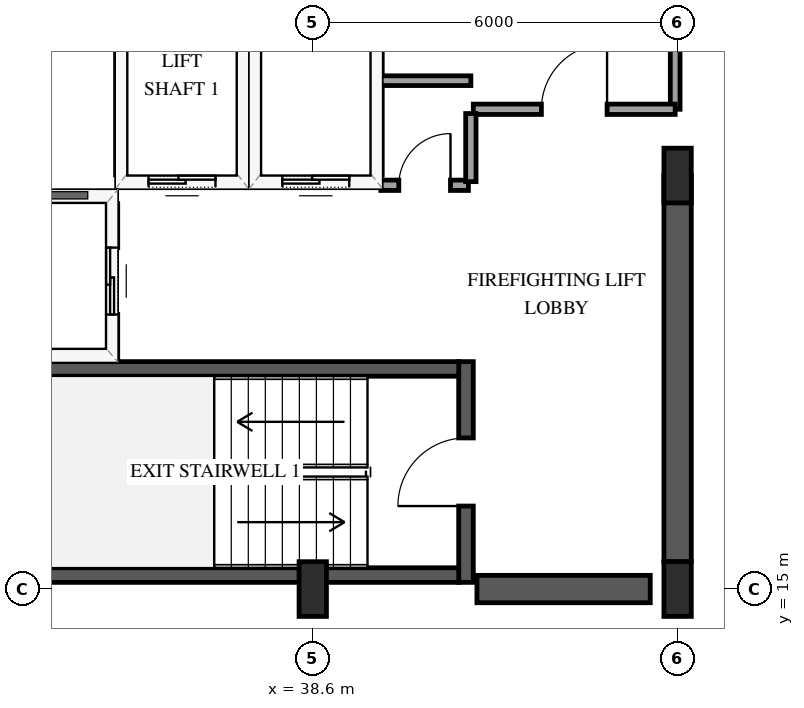
"""IFC4 building model, lengths in metres.
Left out: names, types, materials, properties, quantities, classifications, styles, units other than length and angle.
Written with IfcOpenShell. Run it as: python <this file> out.ifc"""

import sys

from ifc_helpers import new_model, si_unit, direction, frame, frame_2d, origin, origin_2d, place, context, subcontext, project, spatial, rectangle, extrude, element, fill, save


model = new_model("IFC4")
c1 = context("Model", 3, precision=1e-05, world=origin(), true_north=direction((0.0, 1.0)))
c2 = subcontext(c1, "Body", "Model", "MODEL_VIEW")
j1 = project(units=[si_unit("LENGTHUNIT", "METRE"), si_unit("PLANEANGLEUNIT", "RADIAN")], contexts=[c1])
p1 = place(None, origin())
s1 = spatial("IfcSite", under=j1, at=p1, CompositionType="ELEMENT")
p2 = place(p1, origin())
s2 = spatial("IfcBuilding", under=s1, at=p2, CompositionType="ELEMENT")
p3 = place(p2, frame((0.0, 0.0, 208.6)))
s3 = spatial("IfcBuildingStorey", under=s2, at=p3, CompositionType="ELEMENT", Elevation=208.6)
p4 = place(p3, frame((41.12, 15.11, 0.0), z_axis=(0.0, 0.0, 1.0), x_axis=(0.0, 1.0, 0.0)))
e1 = element("IfcWall", 1, at=p4, inside=s3, PredefinedType="SHEAR", context=c2, shape_type="SweptSolid", body=[
    extrude(rectangle(XDim=3.63, YDim=0.24, at=frame_2d((1.815, 0.0))), origin(), (0.0, 0.0, 1.0), 3.6),
])
p5 = place(p4, frame((1.255, 0.0, 0.0)))
e2 = element("IfcOpeningElement", 2, at=p5, cuts=e1, PredefinedType="OPENING", context=c2, shape_type="SweptSolid", body=[
    extrude(rectangle(XDim=1.12, YDim=2.15, at=frame_2d((0.56, 1.075))), frame((0.0, 0.13, 0.0), z_axis=(0.0, -1.0, 0.0), x_axis=(1.0, 0.0, 0.0)), (0.0, 0.0, 1.0), 0.26),
])
for number, where, z_axis, x_axis in (
    (3, (33.0, 15.23, 0.0), (0.0, 0.0, 1.0), (1.0, 0.0, 0.0)),
    (4, (33.0, 18.62, 0.0), (0.0, 0.0, 1.0), (1.0, 0.0, 0.0)),
):
    element("IfcWall", number, at=place(p3, frame(where, z_axis=z_axis, x_axis=x_axis)), inside=s3, PredefinedType="SHEAR", context=c2, shape_type="SweptSolid", body=[
        extrude(rectangle(XDim=8.0, YDim=0.24, at=frame_2d((4.0, 0.0))), origin(), (0.0, 0.0, 1.0), 3.6),
    ])
p6 = place(p3, frame((41.3, 15.0, 0.0), z_axis=(0.0, 0.0, 1.0), x_axis=(1.0, 0.0, 0.0)))
e5 = element("IfcWall", 5, at=p6, inside=s3, PredefinedType="SHEAR", context=c2, shape_type="SweptSolid", body=[
    extrude(rectangle(XDim=2.85, YDim=0.45, at=frame_2d((1.425, 0.0))), origin(), (0.0, 0.0, 1.0), 3.6),
])
p7 = place(p3, frame((44.6, 15.45, 0.0), z_axis=(0.0, 0.0, 1.0), x_axis=(0.0, 1.0, 0.0)))
e6 = element("IfcWall", 6, at=p7, inside=s3, PredefinedType="SHEAR", context=c2, shape_type="SweptSolid", body=[
    extrude(rectangle(XDim=6.35, YDim=0.45, at=frame_2d((3.175, 0.0))), origin(), (0.0, 0.0, 1.0), 3.6),
])
for number, where, z_axis, x_axis in (
    (7, (38.6, 15.0, 0.0), (0.0, 0.0, 1.0), (1.0, 0.0, 0.0)),
    (8, (44.6, 15.0, 0.0), (0.0, 0.0, 1.0), (1.0, 0.0, 0.0)),
    (9, (44.6, 21.8, 0.0), (0.0, 0.0, 1.0), (1.0, 0.0, 0.0)),
):
    element("IfcColumn", number, at=place(p3, frame(where, z_axis=z_axis, x_axis=x_axis)), inside=s3, PredefinedType="PILASTER", context=c2, shape_type="SweptSolid", body=[
        extrude(rectangle(XDim=0.45, YDim=0.9, at=origin_2d()), origin(), (0.0, 0.0, 1.0), 3.6),
    ])
p8 = place(p3, frame((35.45, 21.7, 0.0), z_axis=(0.0, 0.0, 1.0), x_axis=(1.0, 0.0, 0.0)))
e10 = element("IfcWall", 10, at=p8, inside=s3, PredefinedType="SOLIDWALL", context=c2, shape_type="SweptSolid", body=[
    extrude(rectangle(XDim=2.0, YDim=0.185, at=frame_2d((1.0, 0.0))), origin(), (0.0, 0.0, 1.0), 3.3),
])
p9 = place(p8, frame((0.45, 0.0, 0.0)))
e11 = element("IfcOpeningElement", 11, at=p9, cuts=e10, PredefinedType="OPENING", context=c2, shape_type="SweptSolid", body=[
    extrude(rectangle(XDim=1.1, YDim=2.15, at=frame_2d((0.55, 1.075))), frame((0.0, 0.103, 0.0), z_axis=(0.0, -1.0, 0.0), x_axis=(1.0, 0.0, 0.0)), (0.0, 0.0, 1.0), 0.205),
])
for number, where, z_axis, x_axis in (
    (12, (35.45, 21.81, 0.0), (0.0, 0.0, 1.0), (0.0, 1.0, 0.0)),
    (13, (37.45, 21.81, 0.0), (0.0, 0.0, 1.0), (0.0, 1.0, 0.0)),
):
    element("IfcWall", number, at=place(p3, frame(where, z_axis=z_axis, x_axis=x_axis)), inside=s3, PredefinedType="SOLIDWALL", context=c2, shape_type="SweptSolid", body=[
        extrude(rectangle(XDim=2.38, YDim=0.185, at=frame_2d((1.19, 0.0))), origin(), (0.0, 0.0, 1.0), 3.3),
    ])
p10 = place(p3, frame((37.65, 21.7, 0.0), z_axis=(0.0, 0.0, 1.0), x_axis=(1.0, 0.0, 0.0)))
e14 = element("IfcWall", 14, at=p10, inside=s3, PredefinedType="SOLIDWALL", context=c2, shape_type="SweptSolid", body=[
    extrude(rectangle(XDim=2.0, YDim=0.185, at=frame_2d((1.0, 0.0))), origin(), (0.0, 0.0, 1.0), 3.3),
])
p11 = place(p10, frame((0.45, 0.0, 0.0)))
e15 = element("IfcOpeningElement", 15, at=p11, cuts=e14, PredefinedType="OPENING", context=c2, shape_type="SweptSolid", body=[
    extrude(rectangle(XDim=1.1, YDim=2.15, at=frame_2d((0.55, 1.075))), frame((0.0, 0.103, 0.0), z_axis=(0.0, -1.0, 0.0), x_axis=(1.0, 0.0, 0.0)), (0.0, 0.0, 1.0), 0.205),
])
p12 = place(p3, frame((39.65, 21.81, 0.0), z_axis=(0.0, 0.0, 1.0), x_axis=(0.0, 1.0, 0.0)))
e16 = element("IfcWall", 16, at=p12, inside=s3, PredefinedType="SOLIDWALL", context=c2, shape_type="SweptSolid", body=[
    extrude(rectangle(XDim=2.38, YDim=0.185, at=frame_2d((1.19, 0.0))), origin(), (0.0, 0.0, 1.0), 3.3),
])
p13 = place(p3, frame((32.72, 21.45, 0.0), z_axis=(0.0, 0.0, 1.0), x_axis=(1.0, 0.0, 0.0)))
e17 = element("IfcWall", 17, at=p13, inside=s3, PredefinedType="SOLIDWALL", context=c2, shape_type="SweptSolid", body=[
    extrude(rectangle(XDim=2.58, YDim=0.185, at=frame_2d((1.29, 0.0))), origin(), (0.0, 0.0, 1.0), 3.3),
])
p14 = place(p3, frame((35.3, 18.79, 0.0), z_axis=(0.0, 0.0, 1.0), x_axis=(0.0, 1.0, 0.0)))
e18 = element("IfcWall", 18, at=p14, inside=s3, PredefinedType="SOLIDWALL", context=c2, shape_type="SweptSolid", body=[
    extrude(rectangle(XDim=2.55, YDim=0.185, at=frame_2d((1.275, 0.0))), origin(), (0.0, 0.0, 1.0), 3.3),
])
p15 = place(p14, frame((0.725, 0.0, 0.0)))
e19 = element("IfcOpeningElement", 19, at=p15, cuts=e18, PredefinedType="OPENING", context=c2, shape_type="SweptSolid", body=[
    extrude(rectangle(XDim=1.1, YDim=2.15, at=frame_2d((0.55, 1.075))), frame((0.0, 0.103, 0.0), z_axis=(0.0, -1.0, 0.0), x_axis=(1.0, 0.0, 0.0)), (0.0, 0.0, 1.0), 0.205),
])
p16 = place(p3, frame((44.56, 29.8, 0.0), z_axis=(0.0, 0.0, 1.0), x_axis=(0.0, -1.0, 0.0)))
e20 = element("IfcWall", 20, at=p16, inside=s3, PredefinedType="PARTITIONING", context=c2, shape_type="SweptSolid", body=[
    extrude(rectangle(XDim=6.91, YDim=0.16, at=frame_2d((3.455, 0.0))), origin(), (0.0, 0.0, 1.0), 2.34),
])
p17 = place(p16, frame((2.915, 0.0, 0.0)))
e21 = element("IfcOpeningElement", 21, at=p17, cuts=e20, PredefinedType="OPENING", context=c2, shape_type="SweptSolid", body=[
    extrude(rectangle(XDim=1.08, YDim=2.15, at=frame_2d((0.54, 1.075))), frame((0.0, 0.09, 0.0), z_axis=(0.0, -1.0, 0.0), x_axis=(1.0, 0.0, 0.0)), (0.0, 0.0, 1.0), 0.18),
])
p18 = place(p3, frame((41.24, 22.89, 0.0), z_axis=(0.0, 0.0, 1.0), x_axis=(1.0, 0.0, 0.0)))
e22 = element("IfcWall", 22, at=p18, inside=s3, PredefinedType="PARTITIONING", context=c2, shape_type="SweptSolid", body=[
    extrude(rectangle(XDim=3.32, YDim=0.17, at=frame_2d((1.66, 0.0))), origin(), (0.0, 0.0, 1.0), 3.3),
])
p19 = place(p18, frame((1.12, 0.0, 0.0)))
e23 = element("IfcOpeningElement", 23, at=p19, cuts=e22, PredefinedType="OPENING", context=c2, shape_type="SweptSolid", body=[
    extrude(rectangle(XDim=1.08, YDim=2.15, at=frame_2d((0.54, 1.075))), frame((0.0, 0.095, 0.0), z_axis=(0.0, -1.0, 0.0), x_axis=(1.0, 0.0, 0.0)), (0.0, 0.0, 1.0), 0.19),
])
p20 = place(p3, frame((39.72, 21.64, 0.0), z_axis=(0.0, 0.0, 1.0), x_axis=(1.0, 0.0, 0.0)))
e24 = element("IfcWall", 24, at=p20, inside=s3, PredefinedType="PARTITIONING", context=c2, shape_type="SweptSolid", body=[
    extrude(rectangle(XDim=1.44, YDim=0.17, at=frame_2d((0.72, 0.0))), origin(), (0.0, 0.0, 1.0), 3.3),
])
p21 = place(p20, frame((0.295, 0.0, 0.0)))
e25 = element("IfcOpeningElement", 25, at=p21, cuts=e24, PredefinedType="OPENING", context=c2, shape_type="SweptSolid", body=[
    extrude(rectangle(XDim=0.85, YDim=2.1, at=frame_2d((0.425, 1.05))), frame((0.0, 0.095, 0.0), z_axis=(0.0, -1.0, 0.0), x_axis=(1.0, 0.0, 0.0)), (0.0, 0.0, 1.0), 0.19),
])
p22 = place(p3, frame((41.2, 21.7, 0.0), z_axis=(0.0, 0.0, 1.0), x_axis=(0.0, 1.0, 0.0)))
e26 = element("IfcWall", 26, at=p22, inside=s3, PredefinedType="PARTITIONING", context=c2, shape_type="SweptSolid", body=[
    extrude(rectangle(XDim=1.12, YDim=0.17, at=frame_2d((0.56, 0.0))), origin(), (0.0, 0.0, 1.0), 3.3),
])
p23 = place(p3, frame((41.2, 23.36, 0.0), z_axis=(0.0, 0.0, 1.0), x_axis=(-1.0, 0.0, 0.0)))
e27 = element("IfcWall", 27, at=p23, inside=s3, PredefinedType="PARTITIONING", context=c2, shape_type="SweptSolid", body=[
    extrude(rectangle(XDim=1.48, YDim=0.16, at=frame_2d((0.74, 0.0))), origin(), (0.0, 0.0, 1.0), 3.3),
])
p24 = place(p9, origin())
e28 = element("IfcDoor", 28, at=p24, inside=s3, OperationType="SLIDING_TO_LEFT", PredefinedType="DOOR", context=c2, shape_type="SweptSolid", body=[
    extrude(rectangle(XDim=1.1, YDim=2.15, at=frame_2d((0.55, 1.075))), frame((0.0, 0.025, 0.0), z_axis=(0.0, -1.0, 0.0), x_axis=(1.0, 0.0, 0.0)), (0.0, 0.0, 1.0), 0.05),
])
fill(e11, e28)
p25 = place(p11, origin())
e29 = element("IfcDoor", 29, at=p25, inside=s3, OperationType="SLIDING_TO_LEFT", PredefinedType="DOOR", context=c2, shape_type="SweptSolid", body=[
    extrude(rectangle(XDim=1.1, YDim=2.15, at=frame_2d((0.55, 1.075))), frame((0.0, 0.025, 0.0), z_axis=(0.0, -1.0, 0.0), x_axis=(1.0, 0.0, 0.0)), (0.0, 0.0, 1.0), 0.05),
])
fill(e15, e29)
p26 = place(p15, origin())
e30 = element("IfcDoor", 30, at=p26, inside=s3, OperationType="SLIDING_TO_LEFT", PredefinedType="DOOR", context=c2, shape_type="SweptSolid", body=[
    extrude(rectangle(XDim=1.1, YDim=2.15, at=frame_2d((0.55, 1.075))), frame((0.0, 0.025, 0.0), z_axis=(0.0, -1.0, 0.0), x_axis=(1.0, 0.0, 0.0)), (0.0, 0.0, 1.0), 0.05),
])
fill(e19, e30)
p27 = place(p5, origin())
e31 = element("IfcDoor", 31, at=p27, inside=s3, OperationType="SINGLE_SWING_LEFT", PredefinedType="DOOR", context=c2, shape_type="SweptSolid", body=[
    extrude(rectangle(XDim=1.12, YDim=2.15, at=frame_2d((0.56, 1.075))), frame((0.0, 0.025, 0.0), z_axis=(0.0, -1.0, 0.0), x_axis=(1.0, 0.0, 0.0)), (0.0, 0.0, 1.0), 0.05),
])
fill(e2, e31)
p28 = place(p19, origin())
e32 = element("IfcDoor", 32, at=p28, inside=s3, OperationType="SINGLE_SWING_RIGHT", PredefinedType="DOOR", context=c2, shape_type="SweptSolid", body=[
    extrude(rectangle(XDim=1.08, YDim=2.15, at=frame_2d((0.54, 1.075))), frame((0.0, 0.025, 0.0), z_axis=(0.0, -1.0, 0.0), x_axis=(1.0, 0.0, 0.0)), (0.0, 0.0, 1.0), 0.05),
])
fill(e23, e32)
p29 = place(p21, origin())
e33 = element("IfcDoor", 33, at=p29, inside=s3, OperationType="SINGLE_SWING_RIGHT", PredefinedType="DOOR", context=c2, shape_type="SweptSolid", body=[
    extrude(rectangle(XDim=0.85, YDim=2.1, at=frame_2d((0.425, 1.05))), frame((0.0, 0.025, 0.0), z_axis=(0.0, -1.0, 0.0), x_axis=(1.0, 0.0, 0.0)), (0.0, 0.0, 1.0), 0.05),
])
fill(e25, e33)
save(model, sys.argv[1])
